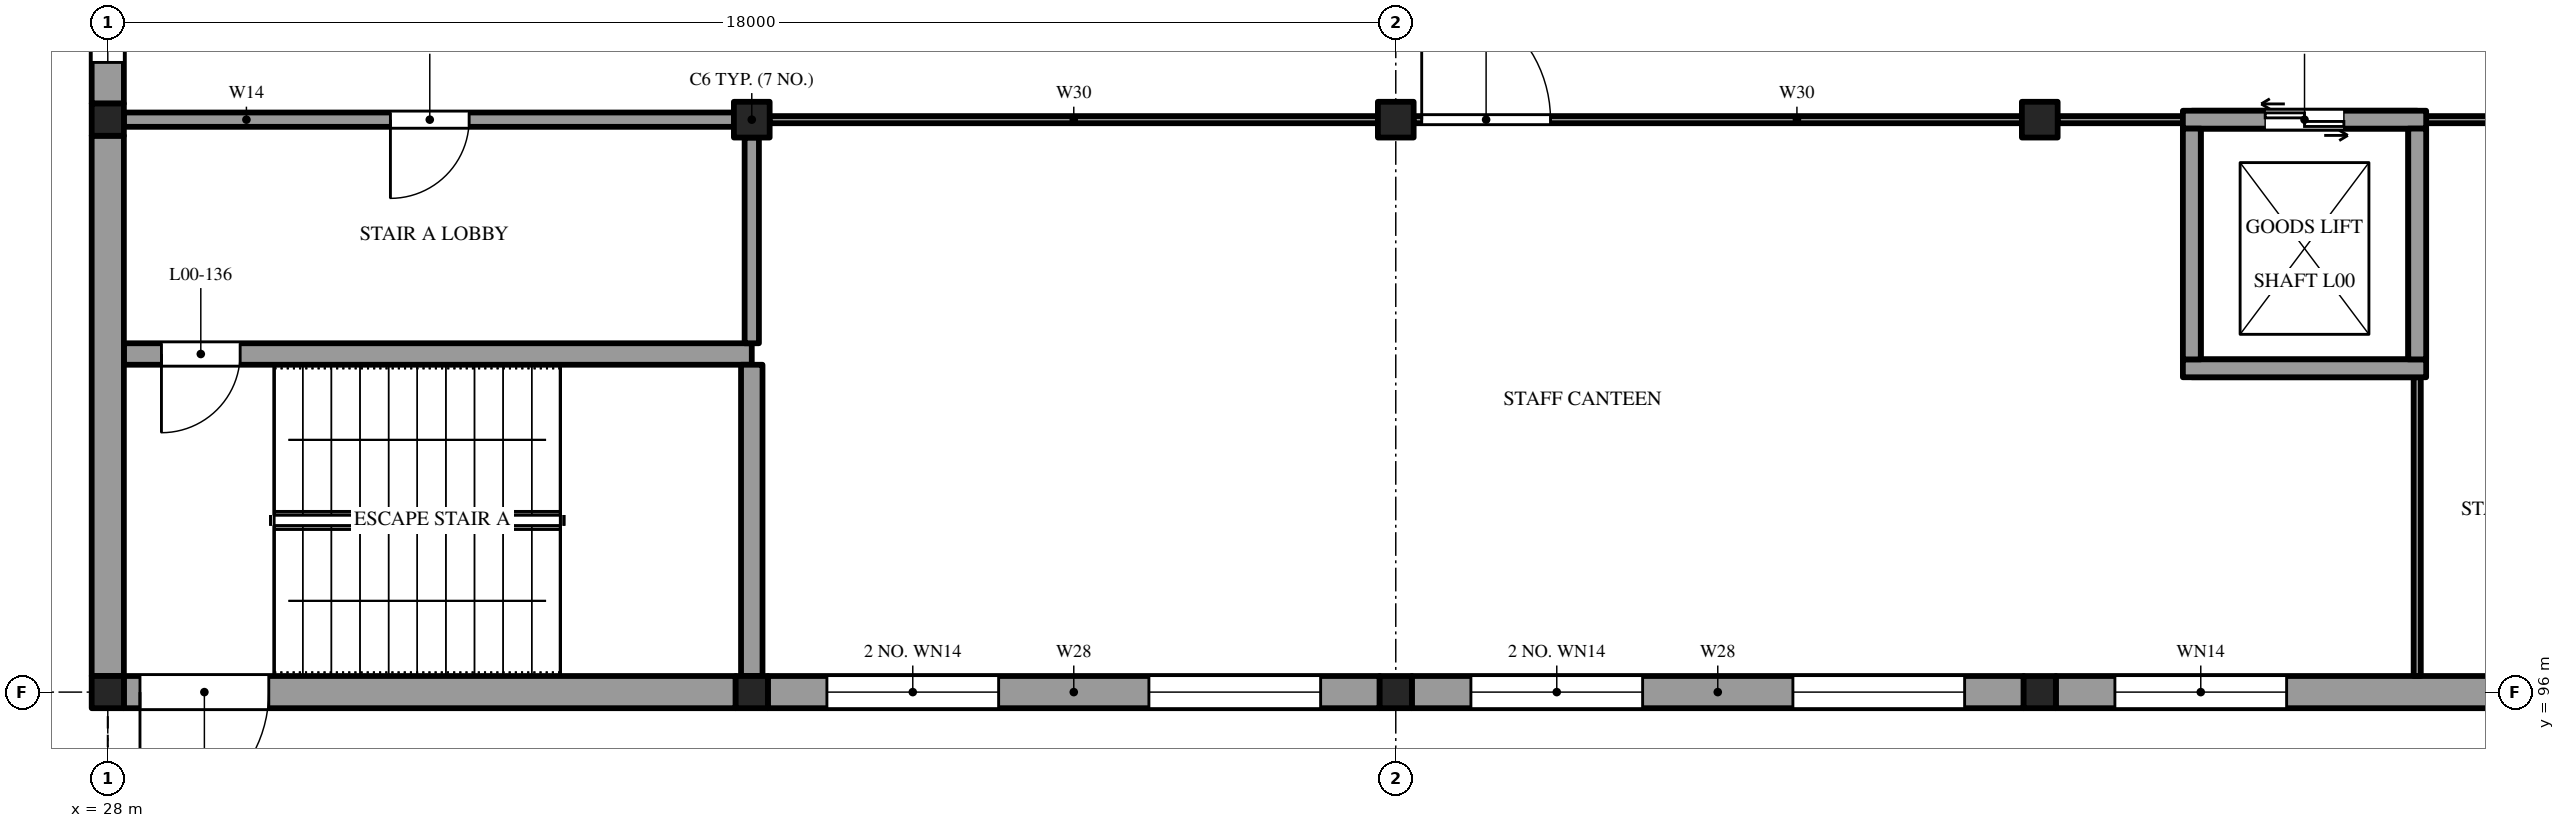
"""IFC4 building model, lengths in metres.
Left out: names, types, materials, properties, quantities, classifications, styles, units other than length and angle.
Written with IfcOpenShell. Run it as: python <this file> out.ifc"""

import sys

from ifc_helpers import new_model, si_unit, direction, frame, frame_2d, origin, origin_2d, place, context, subcontext, project, spatial, rectangle, extrude, element, fill, save


model = new_model("IFC4")
c1 = context("Model", 3, precision=1e-05, world=origin(), true_north=direction((0.0, 1.0)))
c2 = subcontext(c1, "Body", "Model", "MODEL_VIEW")
j1 = project(units=[si_unit("LENGTHUNIT", "METRE"), si_unit("PLANEANGLEUNIT", "RADIAN")], contexts=[c1])
p1 = place(None, origin())
s1 = spatial("IfcSite", under=j1, at=p1, CompositionType="ELEMENT")
p2 = place(p1, origin())
s2 = spatial("IfcBuilding", under=s1, at=p2, CompositionType="ELEMENT")
p3 = place(p2, origin())
s3 = spatial("IfcBuildingStorey", under=s2, at=p3, CompositionType="ELEMENT", Elevation=0.0)
for number, where, z_axis, x_axis in (
    (1, (28.0, 96.0, -0.4), (0.0, 0.0, 1.0), (1.0, 0.0, 0.0)),
    (2, (28.0, 104.0, -0.4), (0.0, 0.0, 1.0), (1.0, 0.0, 0.0)),
    (3, (37.0, 96.0, -0.4), (0.0, 0.0, 1.0), (1.0, 0.0, 0.0)),
):
    element("IfcColumn", number, at=place(p3, frame(where, z_axis=z_axis, x_axis=x_axis)), inside=s3, PredefinedType="COLUMN", context=c2, shape_type="SweptSolid", body=[
        extrude(rectangle(XDim=0.45, YDim=0.45, at=origin_2d()), origin(), (0.0, 0.0, 1.0), 7.6),
    ])
p4 = place(p3, frame((37.0, 104.0, -0.4), z_axis=(0.0, 0.0, 1.0), x_axis=(1.0, 0.0, 0.0)))
e4 = element("IfcColumn", 4, at=p4, inside=s3, PredefinedType="COLUMN", context=c2, shape_type="SweptSolid", body=[
    extrude(rectangle(XDim=0.5, YDim=0.5, at=origin_2d()), origin(), (0.0, 0.0, 1.0), 7.6),
])
p5 = place(p3, frame((46.0, 96.0, -0.4), z_axis=(0.0, 0.0, 1.0), x_axis=(1.0, 0.0, 0.0)))
e5 = element("IfcColumn", 5, at=p5, inside=s3, PredefinedType="COLUMN", context=c2, shape_type="SweptSolid", body=[
    extrude(rectangle(XDim=0.45, YDim=0.45, at=origin_2d()), origin(), (0.0, 0.0, 1.0), 7.6),
])
p6 = place(p3, frame((46.0, 104.0, -0.4), z_axis=(0.0, 0.0, 1.0), x_axis=(1.0, 0.0, 0.0)))
e6 = element("IfcColumn", 6, at=p6, inside=s3, PredefinedType="COLUMN", context=c2, shape_type="SweptSolid", body=[
    extrude(rectangle(XDim=0.5, YDim=0.5, at=origin_2d()), origin(), (0.0, 0.0, 1.0), 7.6),
])
p7 = place(p3, frame((55.0, 96.0, -0.4), z_axis=(0.0, 0.0, 1.0), x_axis=(1.0, 0.0, 0.0)))
e7 = element("IfcColumn", 7, at=p7, inside=s3, PredefinedType="COLUMN", context=c2, shape_type="SweptSolid", body=[
    extrude(rectangle(XDim=0.45, YDim=0.45, at=origin_2d()), origin(), (0.0, 0.0, 1.0), 7.6),
])
p8 = place(p3, frame((55.0, 104.0, -0.4), z_axis=(0.0, 0.0, 1.0), x_axis=(1.0, 0.0, 0.0)))
e8 = element("IfcColumn", 8, at=p8, inside=s3, PredefinedType="COLUMN", context=c2, shape_type="SweptSolid", body=[
    extrude(rectangle(XDim=0.5, YDim=0.5, at=origin_2d()), origin(), (0.0, 0.0, 1.0), 7.6),
])
p9 = place(p3, frame((28.225, 96.0, 0.0), z_axis=(0.0, 0.0, 1.0), x_axis=(1.0, 0.0, 0.0)))
e9 = element("IfcWall", 9, at=p9, inside=s3, PredefinedType="SOLIDWALL", context=c2, shape_type="SweptSolid", body=[
    extrude(rectangle(XDim=8.55, YDim=0.45, at=frame_2d((4.275, 0.0))), origin(), (0.0, 0.0, 1.0), 6.9),
])
p10 = place(p9, frame((0.225, 0.0, 0.0)))
e10 = element("IfcOpeningElement", 10, at=p10, cuts=e9, PredefinedType="OPENING", context=c2, shape_type="SweptSolid", body=[
    extrude(rectangle(XDim=1.8, YDim=2.1, at=frame_2d((0.9, 1.05))), frame((0.0, 0.235, 0.0), z_axis=(0.0, -1.0, 0.0), x_axis=(1.0, 0.0, 0.0)), (0.0, 0.0, 1.0), 0.47),
])
p11 = place(p3, frame((37.225, 96.0, 0.0), z_axis=(0.0, 0.0, 1.0), x_axis=(1.0, 0.0, 0.0)))
e11 = element("IfcWall", 11, at=p11, inside=s3, PredefinedType="SOLIDWALL", context=c2, shape_type="SweptSolid", body=[
    extrude(rectangle(XDim=8.55, YDim=0.45, at=frame_2d((4.275, 0.0))), origin(), (0.0, 0.0, 1.0), 6.9),
])
p12 = place(p11, frame((0.825, 0.0, 4.4)))
e12 = element("IfcOpeningElement", 12, at=p12, cuts=e11, PredefinedType="OPENING", context=c2, shape_type="SweptSolid", body=[
    extrude(rectangle(XDim=2.4, YDim=1.6, at=frame_2d((1.2, 0.8))), frame((0.0, 0.235, 0.0), z_axis=(0.0, -1.0, 0.0), x_axis=(1.0, 0.0, 0.0)), (0.0, 0.0, 1.0), 0.47),
])
p13 = place(p11, frame((5.325, 0.0, 4.4)))
e13 = element("IfcOpeningElement", 13, at=p13, cuts=e11, PredefinedType="OPENING", context=c2, shape_type="SweptSolid", body=[
    extrude(rectangle(XDim=2.4, YDim=1.6, at=frame_2d((1.2, 0.8))), frame((0.0, 0.235, 0.0), z_axis=(0.0, -1.0, 0.0), x_axis=(1.0, 0.0, 0.0)), (0.0, 0.0, 1.0), 0.47),
])
p14 = place(p3, frame((46.225, 96.0, 0.0), z_axis=(0.0, 0.0, 1.0), x_axis=(1.0, 0.0, 0.0)))
e14 = element("IfcWall", 14, at=p14, inside=s3, PredefinedType="SOLIDWALL", context=c2, shape_type="SweptSolid", body=[
    extrude(rectangle(XDim=8.55, YDim=0.45, at=frame_2d((4.275, 0.0))), origin(), (0.0, 0.0, 1.0), 6.9),
])
p15 = place(p14, frame((0.825, 0.0, 4.4)))
e15 = element("IfcOpeningElement", 15, at=p15, cuts=e14, PredefinedType="OPENING", context=c2, shape_type="SweptSolid", body=[
    extrude(rectangle(XDim=2.4, YDim=1.6, at=frame_2d((1.2, 0.8))), frame((0.0, 0.235, 0.0), z_axis=(0.0, -1.0, 0.0), x_axis=(1.0, 0.0, 0.0)), (0.0, 0.0, 1.0), 0.47),
])
p16 = place(p14, frame((5.325, 0.0, 4.4)))
e16 = element("IfcOpeningElement", 16, at=p16, cuts=e14, PredefinedType="OPENING", context=c2, shape_type="SweptSolid", body=[
    extrude(rectangle(XDim=2.4, YDim=1.6, at=frame_2d((1.2, 0.8))), frame((0.0, 0.235, 0.0), z_axis=(0.0, -1.0, 0.0), x_axis=(1.0, 0.0, 0.0)), (0.0, 0.0, 1.0), 0.47),
])
p17 = place(p3, frame((55.225, 96.0, 0.0), z_axis=(0.0, 0.0, 1.0), x_axis=(1.0, 0.0, 0.0)))
e17 = element("IfcWall", 17, at=p17, inside=s3, PredefinedType="SOLIDWALL", context=c2, shape_type="SweptSolid", body=[
    extrude(rectangle(XDim=8.55, YDim=0.45, at=frame_2d((4.275, 0.0))), origin(), (0.0, 0.0, 1.0), 6.9),
])
p18 = place(p17, frame((0.825, 0.0, 4.4)))
e18 = element("IfcOpeningElement", 18, at=p18, cuts=e17, PredefinedType="OPENING", context=c2, shape_type="SweptSolid", body=[
    extrude(rectangle(XDim=2.4, YDim=1.6, at=frame_2d((1.2, 0.8))), frame((0.0, 0.235, 0.0), z_axis=(0.0, -1.0, 0.0), x_axis=(1.0, 0.0, 0.0)), (0.0, 0.0, 1.0), 0.47),
])
p19 = place(p3, frame((57.125, 100.525, 0.0), z_axis=(0.0, 0.0, 1.0), x_axis=(1.0, 0.0, 0.0)))
e19 = element("IfcWall", 19, at=p19, inside=s3, PredefinedType="SOLIDWALL", context=c2, shape_type="SweptSolid", body=[
    extrude(rectangle(XDim=3.15, YDim=0.25, at=frame_2d((1.575, 0.0))), origin(), (0.0, 0.0, 1.0), 6.9),
])
p20 = place(p3, frame((28.225, 100.725, 0.0), z_axis=(0.0, 0.0, 1.0), x_axis=(1.0, 0.0, 0.0)))
e20 = element("IfcWall", 20, at=p20, inside=s3, PredefinedType="SHEAR", context=c2, shape_type="SweptSolid", body=[
    extrude(rectangle(XDim=8.775, YDim=0.3, at=frame_2d((4.387, 0.0))), origin(), (0.0, 0.0, 1.0), 6.9),
])
p21 = place(p20, frame((0.525, 0.0, 0.0)))
e21 = element("IfcOpeningElement", 21, at=p21, cuts=e20, PredefinedType="OPENING", context=c2, shape_type="SweptSolid", body=[
    extrude(rectangle(XDim=1.1, YDim=2.1, at=frame_2d((0.55, 1.05))), frame((0.0, 0.16, 0.0), z_axis=(0.0, -1.0, 0.0), x_axis=(1.0, 0.0, 0.0)), (0.0, 0.0, 1.0), 0.32),
])
p22 = place(p3, frame((28.225, 104.0, 0.0), z_axis=(0.0, 0.0, 1.0), x_axis=(1.0, 0.0, 0.0)))
e22 = element("IfcWall", 22, at=p22, inside=s3, PredefinedType="SOLIDWALL", context=c2, shape_type="SweptSolid", body=[
    extrude(rectangle(XDim=8.525, YDim=0.2, at=frame_2d((4.262, 0.0))), origin(), (0.0, 0.0, 1.0), 6.9),
])
p23 = place(p22, frame((3.725, 0.0, 0.0)))
e23 = element("IfcOpeningElement", 23, at=p23, cuts=e22, PredefinedType="OPENING", context=c2, shape_type="SweptSolid", body=[
    extrude(rectangle(XDim=1.1, YDim=2.1, at=frame_2d((0.55, 1.05))), frame((0.0, 0.11, 0.0), z_axis=(0.0, -1.0, 0.0), x_axis=(1.0, 0.0, 0.0)), (0.0, 0.0, 1.0), 0.22),
])
p24 = place(p3, frame((37.25, 104.0, 0.0), z_axis=(0.0, 0.0, 1.0), x_axis=(1.0, 0.0, 0.0)))
e24 = element("IfcWall", 24, at=p24, inside=s3, PredefinedType="PARTITIONING", context=c2, shape_type="SweptSolid", body=[
    extrude(rectangle(XDim=8.5, YDim=0.1, at=frame_2d((4.25, 0.0))), origin(), (0.0, 0.0, 1.0), 6.9),
])
p25 = place(p3, frame((46.25, 104.0, 0.0), z_axis=(0.0, 0.0, 1.0), x_axis=(1.0, 0.0, 0.0)))
e25 = element("IfcWall", 25, at=p25, inside=s3, PredefinedType="PARTITIONING", context=c2, shape_type="SweptSolid", body=[
    extrude(rectangle(XDim=8.5, YDim=0.1, at=frame_2d((4.25, 0.0))), origin(), (0.0, 0.0, 1.0), 6.9),
])
p26 = place(p25, frame((0.113, 0.0, 0.0)))
e26 = element("IfcOpeningElement", 26, at=p26, cuts=e25, PredefinedType="OPENING", context=c2, shape_type="SweptSolid", body=[
    extrude(rectangle(XDim=1.8, YDim=2.1, at=frame_2d((0.9, 1.05))), frame((0.0, 0.06, 0.0), z_axis=(0.0, -1.0, 0.0), x_axis=(1.0, 0.0, 0.0)), (0.0, 0.0, 1.0), 0.12),
])
p27 = place(p3, frame((55.25, 104.0, 0.0), z_axis=(0.0, 0.0, 1.0), x_axis=(1.0, 0.0, 0.0)))
e27 = element("IfcWall", 27, at=p27, inside=s3, PredefinedType="PARTITIONING", context=c2, shape_type="SweptSolid", body=[
    extrude(rectangle(XDim=1.875, YDim=0.1, at=frame_2d((0.938, 0.0))), origin(), (0.0, 0.0, 1.0), 6.9),
])
p28 = place(p3, frame((57.125, 104.0, 0.0), z_axis=(0.0, 0.0, 1.0), x_axis=(1.0, 0.0, 0.0)))
e28 = element("IfcWall", 28, at=p28, inside=s3, PredefinedType="SOLIDWALL", context=c2, shape_type="SweptSolid", body=[
    extrude(rectangle(XDim=3.15, YDim=0.25, at=frame_2d((1.575, 0.0))), origin(), (0.0, 0.0, 1.0), 6.9),
])
p29 = place(p28, frame((1.025, 0.0, 0.0)))
e29 = element("IfcOpeningElement", 29, at=p29, cuts=e28, PredefinedType="OPENING", context=c2, shape_type="SweptSolid", body=[
    extrude(rectangle(XDim=1.1, YDim=2.1, at=frame_2d((0.55, 1.05))), frame((0.0, 0.135, 0.0), z_axis=(0.0, -1.0, 0.0), x_axis=(1.0, 0.0, 0.0)), (0.0, 0.0, 1.0), 0.27),
])
p30 = place(p3, frame((60.275, 104.0, 0.0), z_axis=(0.0, 0.0, 1.0), x_axis=(1.0, 0.0, 0.0)))
e30 = element("IfcWall", 30, at=p30, inside=s3, PredefinedType="PARTITIONING", context=c2, shape_type="SweptSolid", body=[
    extrude(rectangle(XDim=3.475, YDim=0.1, at=frame_2d((1.738, 0.0))), origin(), (0.0, 0.0, 1.0), 6.9),
])
p31 = place(p30, frame((1.363, 0.0, 0.0)))
e31 = element("IfcOpeningElement", 31, at=p31, cuts=e30, PredefinedType="OPENING", context=c2, shape_type="SweptSolid", body=[
    extrude(rectangle(XDim=1.0, YDim=2.1, at=frame_2d((0.5, 1.05))), frame((0.0, 0.06, 0.0), z_axis=(0.0, -1.0, 0.0), x_axis=(1.0, 0.0, 0.0)), (0.0, 0.0, 1.0), 0.12),
])
p32 = place(p3, frame((28.0, 103.775, 0.0), z_axis=(0.0, 0.0, 1.0), x_axis=(0.0, -1.0, 0.0)))
e32 = element("IfcWall", 32, at=p32, inside=s3, PredefinedType="SOLIDWALL", context=c2, shape_type="SweptSolid", body=[
    extrude(rectangle(XDim=7.55, YDim=0.45, at=frame_2d((3.775, 0.0))), origin(), (0.0, 0.0, 1.0), 6.9),
])
p33 = place(p3, frame((28.0, 111.775, 0.0), z_axis=(0.0, 0.0, 1.0), x_axis=(0.0, -1.0, 0.0)))
e33 = element("IfcWall", 33, at=p33, inside=s3, PredefinedType="SOLIDWALL", context=c2, shape_type="SweptSolid", body=[
    extrude(rectangle(XDim=7.55, YDim=0.45, at=frame_2d((3.775, 0.0))), origin(), (0.0, 0.0, 1.0), 6.9),
])
p34 = place(p33, frame((4.575, 0.0, 4.4)))
e34 = element("IfcOpeningElement", 34, at=p34, cuts=e33, PredefinedType="OPENING", context=c2, shape_type="SweptSolid", body=[
    extrude(rectangle(XDim=2.4, YDim=1.6, at=frame_2d((1.2, 0.8))), frame((0.0, 0.235, 0.0), z_axis=(0.0, -1.0, 0.0), x_axis=(1.0, 0.0, 0.0)), (0.0, 0.0, 1.0), 0.47),
])
p35 = place(p33, frame((0.575, 0.0, 4.4)))
e35 = element("IfcOpeningElement", 35, at=p35, cuts=e33, PredefinedType="OPENING", context=c2, shape_type="SweptSolid", body=[
    extrude(rectangle(XDim=2.4, YDim=1.6, at=frame_2d((1.2, 0.8))), frame((0.0, 0.235, 0.0), z_axis=(0.0, -1.0, 0.0), x_axis=(1.0, 0.0, 0.0)), (0.0, 0.0, 1.0), 0.47),
])
p36 = place(p3, frame((37.0, 96.225, 0.0), z_axis=(0.0, 0.0, 1.0), x_axis=(0.0, 1.0, 0.0)))
e36 = element("IfcWall", 36, at=p36, inside=s3, PredefinedType="SHEAR", context=c2, shape_type="SweptSolid", body=[
    extrude(rectangle(XDim=4.35, YDim=0.3, at=frame_2d((2.175, 0.0))), origin(), (0.0, 0.0, 1.0), 6.9),
])
p37 = place(p3, frame((37.0, 100.875, 0.0), z_axis=(0.0, 0.0, 1.0), x_axis=(0.0, 1.0, 0.0)))
e37 = element("IfcWall", 37, at=p37, inside=s3, PredefinedType="SOLIDWALL", context=c2, shape_type="SweptSolid", body=[
    extrude(rectangle(XDim=2.875, YDim=0.2, at=frame_2d((1.438, 0.0))), origin(), (0.0, 0.0, 1.0), 6.9),
])
p38 = place(p3, frame((57.125, 100.65, 0.0), z_axis=(0.0, 0.0, 1.0), x_axis=(0.0, 1.0, 0.0)))
e38 = element("IfcWall", 38, at=p38, inside=s3, PredefinedType="SOLIDWALL", context=c2, shape_type="SweptSolid", body=[
    extrude(rectangle(XDim=3.225, YDim=0.25, at=frame_2d((1.613, 0.0))), origin(), (0.0, 0.0, 1.0), 6.9),
])
p39 = place(p3, frame((60.275, 96.225, 0.0), z_axis=(0.0, 0.0, 1.0), x_axis=(0.0, 1.0, 0.0)))
e39 = element("IfcWall", 39, at=p39, inside=s3, PredefinedType="PARTITIONING", context=c2, shape_type="SweptSolid", body=[
    extrude(rectangle(XDim=4.175, YDim=0.1, at=frame_2d((2.087, 0.0))), origin(), (0.0, 0.0, 1.0), 6.9),
])
p40 = place(p3, frame((60.275, 100.65, 0.0), z_axis=(0.0, 0.0, 1.0), x_axis=(0.0, 1.0, 0.0)))
e40 = element("IfcWall", 40, at=p40, inside=s3, PredefinedType="SOLIDWALL", context=c2, shape_type="SweptSolid", body=[
    extrude(rectangle(XDim=3.225, YDim=0.25, at=frame_2d((1.613, 0.0))), origin(), (0.0, 0.0, 1.0), 6.9),
])
for number, where, z_axis, x_axis in (
    (41, (57.0, 100.525, -1.4), (0.0, 0.0, 1.0), (1.0, 0.0, 0.0)),
    (42, (57.0, 104.0, -1.4), (0.0, 0.0, 1.0), (1.0, 0.0, 0.0)),
):
    element("IfcWall", number, at=place(p3, frame(where, z_axis=z_axis, x_axis=x_axis)), inside=s3, PredefinedType="SOLIDWALL", context=c2, shape_type="SweptSolid", body=[
        extrude(rectangle(XDim=3.4, YDim=0.25, at=frame_2d((1.7, 0.0))), origin(), (0.0, 0.0, 1.0), 1.1),
    ])
for number, where, z_axis, x_axis in (
    (43, (57.125, 100.65, -1.4), (0.0, 0.0, 1.0), (0.0, 1.0, 0.0)),
    (44, (60.275, 100.65, -1.4), (0.0, 0.0, 1.0), (0.0, 1.0, 0.0)),
):
    element("IfcWall", number, at=place(p3, frame(where, z_axis=z_axis, x_axis=x_axis)), inside=s3, PredefinedType="SOLIDWALL", context=c2, shape_type="SweptSolid", body=[
        extrude(rectangle(XDim=3.225, YDim=0.25, at=frame_2d((1.613, 0.0))), origin(), (0.0, 0.0, 1.0), 1.1),
    ])
p41 = place(p23, frame((1.1, 0.0, 0.0), z_axis=(0.0, 0.0, 1.0), x_axis=(-1.0, 0.0, 0.0)))
e45 = element("IfcDoor", 45, at=p41, inside=s3, OperationType="SINGLE_SWING_RIGHT", PredefinedType="DOOR", context=c2, shape_type="SweptSolid", body=[
    extrude(rectangle(XDim=1.1, YDim=2.1, at=frame_2d((0.55, 1.05))), frame((0.0, 0.025, 0.0), z_axis=(0.0, -1.0, 0.0), x_axis=(1.0, 0.0, 0.0)), (0.0, 0.0, 1.0), 0.05),
])
fill(e23, e45)
p42 = place(p21, frame((1.1, 0.0, 0.0), z_axis=(0.0, 0.0, 1.0), x_axis=(-1.0, 0.0, 0.0)))
e46 = element("IfcDoor", 46, at=p42, inside=s3, OperationType="SINGLE_SWING_LEFT", PredefinedType="DOOR", context=c2, shape_type="SweptSolid", body=[
    extrude(rectangle(XDim=1.1, YDim=2.1, at=frame_2d((0.55, 1.05))), frame((0.0, 0.025, 0.0), z_axis=(0.0, -1.0, 0.0), x_axis=(1.0, 0.0, 0.0)), (0.0, 0.0, 1.0), 0.05),
])
fill(e21, e46)
p43 = place(p10, frame((1.8, 0.0, 0.0), z_axis=(0.0, 0.0, 1.0), x_axis=(-1.0, 0.0, 0.0)))
e47 = element("IfcDoor", 47, at=p43, inside=s3, OperationType="DOUBLE_DOOR_SINGLE_SWING", PredefinedType="DOOR", context=c2, shape_type="SweptSolid", body=[
    extrude(rectangle(XDim=1.8, YDim=2.1, at=frame_2d((0.9, 1.05))), frame((0.0, 0.025, 0.0), z_axis=(0.0, -1.0, 0.0), x_axis=(1.0, 0.0, 0.0)), (0.0, 0.0, 1.0), 0.05),
])
fill(e10, e47)
p44 = place(p26, origin())
e48 = element("IfcDoor", 48, at=p44, inside=s3, OperationType="DOUBLE_DOOR_SINGLE_SWING", PredefinedType="DOOR", context=c2, shape_type="SweptSolid", body=[
    extrude(rectangle(XDim=1.8, YDim=2.1, at=frame_2d((0.9, 1.05))), frame((0.0, 0.025, 0.0), z_axis=(0.0, -1.0, 0.0), x_axis=(1.0, 0.0, 0.0)), (0.0, 0.0, 1.0), 0.05),
])
fill(e26, e48)
p45 = place(p29, origin())
e49 = element("IfcDoor", 49, at=p45, inside=s3, OperationType="DOUBLE_DOOR_SLIDING", PredefinedType="DOOR", context=c2, shape_type="SweptSolid", body=[
    extrude(rectangle(XDim=1.1, YDim=2.1, at=frame_2d((0.55, 1.05))), frame((0.0, 0.025, 0.0), z_axis=(0.0, -1.0, 0.0), x_axis=(1.0, 0.0, 0.0)), (0.0, 0.0, 1.0), 0.05),
])
fill(e29, e49)
p46 = place(p12, origin())
e50 = element("IfcWindow", 50, at=p46, inside=s3, PartitioningType="SINGLE_PANEL", PredefinedType="WINDOW", context=c2, shape_type="SweptSolid", body=[
    extrude(rectangle(XDim=2.4, YDim=1.6, at=frame_2d((1.2, 0.8))), frame((0.0, 0.215, 0.0), z_axis=(0.0, -1.0, 0.0), x_axis=(1.0, 0.0, 0.0)), (0.0, 0.0, 1.0), 0.06),
])
fill(e12, e50)
p47 = place(p13, origin())
e51 = element("IfcWindow", 51, at=p47, inside=s3, PartitioningType="SINGLE_PANEL", PredefinedType="WINDOW", context=c2, shape_type="SweptSolid", body=[
    extrude(rectangle(XDim=2.4, YDim=1.6, at=frame_2d((1.2, 0.8))), frame((0.0, 0.215, 0.0), z_axis=(0.0, -1.0, 0.0), x_axis=(1.0, 0.0, 0.0)), (0.0, 0.0, 1.0), 0.06),
])
fill(e13, e51)
p48 = place(p15, origin())
e52 = element("IfcWindow", 52, at=p48, inside=s3, PartitioningType="SINGLE_PANEL", PredefinedType="WINDOW", context=c2, shape_type="SweptSolid", body=[
    extrude(rectangle(XDim=2.4, YDim=1.6, at=frame_2d((1.2, 0.8))), frame((0.0, 0.215, 0.0), z_axis=(0.0, -1.0, 0.0), x_axis=(1.0, 0.0, 0.0)), (0.0, 0.0, 1.0), 0.06),
])
fill(e15, e52)
p49 = place(p16, origin())
e53 = element("IfcWindow", 53, at=p49, inside=s3, PartitioningType="SINGLE_PANEL", PredefinedType="WINDOW", context=c2, shape_type="SweptSolid", body=[
    extrude(rectangle(XDim=2.4, YDim=1.6, at=frame_2d((1.2, 0.8))), frame((0.0, 0.215, 0.0), z_axis=(0.0, -1.0, 0.0), x_axis=(1.0, 0.0, 0.0)), (0.0, 0.0, 1.0), 0.06),
])
fill(e16, e53)
p50 = place(p18, origin())
e54 = element("IfcWindow", 54, at=p50, inside=s3, PartitioningType="SINGLE_PANEL", PredefinedType="WINDOW", context=c2, shape_type="SweptSolid", body=[
    extrude(rectangle(XDim=2.4, YDim=1.6, at=frame_2d((1.2, 0.8))), frame((0.0, 0.215, 0.0), z_axis=(0.0, -1.0, 0.0), x_axis=(1.0, 0.0, 0.0)), (0.0, 0.0, 1.0), 0.06),
])
fill(e18, e54)
p51 = place(p34, origin())
e55 = element("IfcWindow", 55, at=p51, inside=s3, PartitioningType="SINGLE_PANEL", PredefinedType="WINDOW", context=c2, shape_type="SweptSolid", body=[
    extrude(rectangle(XDim=2.4, YDim=1.6, at=frame_2d((1.2, 0.8))), frame((0.0, 0.215, 0.0), z_axis=(0.0, -1.0, 0.0), x_axis=(1.0, 0.0, 0.0)), (0.0, 0.0, 1.0), 0.06),
])
fill(e34, e55)
save(model, sys.argv[1])
